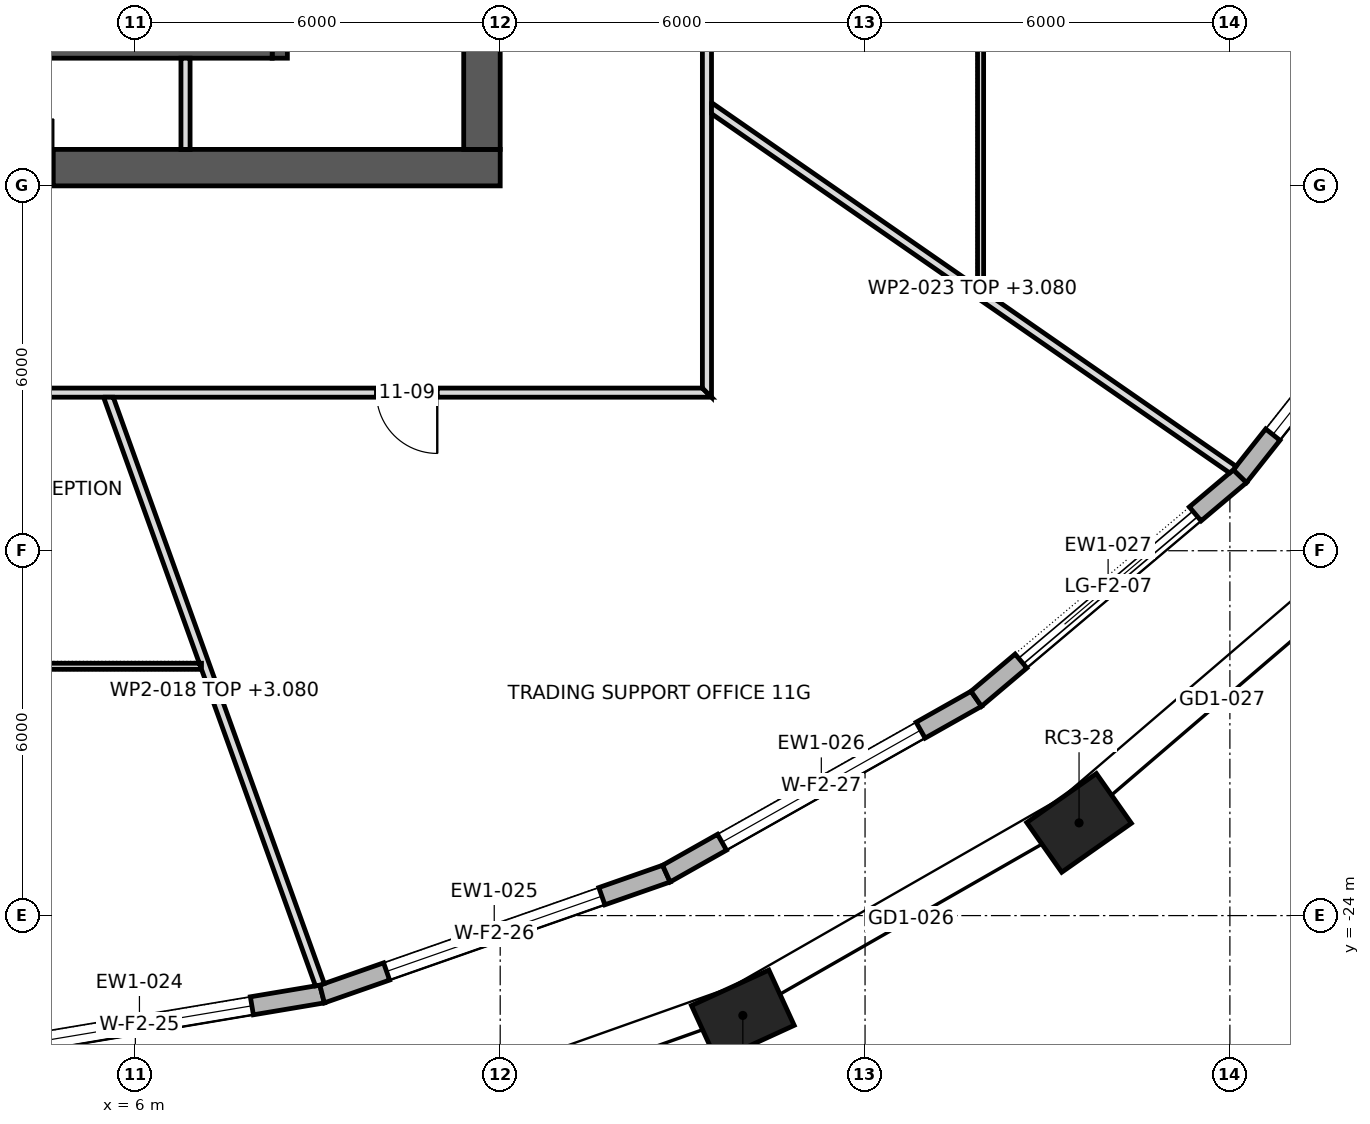
"""IFC4 building model, lengths in metres.
Left out: names, types, materials, properties, quantities, classifications, styles, units other than length and angle.
Written with IfcOpenShell. Run it as: python <this file> out.ifc"""

import sys

from ifc_helpers import new_model, si_unit, direction, frame, frame_2d, origin, origin_2d, place, context, subcontext, project, spatial, polyline, rectangle, outline, extrude, element, fill, save


model = new_model("IFC4")
c1 = context("Model", 3, precision=1e-05, world=origin(), true_north=direction((0.0, 1.0)))
c2 = subcontext(c1, "Body", "Model", "MODEL_VIEW")
j1 = project(units=[si_unit("LENGTHUNIT", "METRE"), si_unit("PLANEANGLEUNIT", "RADIAN")], contexts=[c1])
p1 = place(None, origin())
s1 = spatial("IfcSite", under=j1, at=p1, CompositionType="ELEMENT")
p2 = place(p1, origin())
s2 = spatial("IfcBuilding", under=s1, at=p2, CompositionType="ELEMENT")
p3 = place(p2, frame((0.0, 0.0, 163.3)))
s3 = spatial("IfcBuildingStorey", under=s2, at=p3, CompositionType="ELEMENT", Elevation=163.3)
for number, where, z_axis, x_axis in (
    (1, (15.99, -25.642, 0.0), (0.0, 0.0, 1.0), (0.909, 0.417, 0.0)),
    (2, (21.519, -22.475, 0.0), (0.0, 0.0, 1.0), (0.818, 0.575, 0.0)),
):
    element("IfcColumn", number, at=place(p3, frame(where, z_axis=z_axis, x_axis=x_axis)), inside=s3, PredefinedType="COLUMN", context=c2, shape_type="SweptSolid", body=[
        extrude(rectangle(XDim=1.4, YDim=1.0, at=origin_2d()), origin(), (0.0, 0.0, 1.0), 4.2),
    ])
p4 = place(p3, frame((-12.0, -11.7, 0.0), z_axis=(0.0, 0.0, 1.0), x_axis=(1.0, 0.0, 0.0)))
e3 = element("IfcWall", 3, at=p4, inside=s3, PredefinedType="SHEAR", context=c2, shape_type="SweptSolid", body=[
    extrude(rectangle(XDim=24.0, YDim=0.6, at=frame_2d((12.0, 0.0))), origin(), (0.0, 0.0, 1.0), 4.2),
])
p5 = place(p4, frame((9.975, 0.0, 0.0)))
e4 = element("IfcOpeningElement", 4, at=p5, cuts=e3, PredefinedType="OPENING", context=c2, shape_type="SweptSolid", body=[
    extrude(rectangle(XDim=0.9, YDim=2.1, at=frame_2d((0.45, 1.05))), frame((0.0, 0.312, 0.0), z_axis=(0.0, -1.0, 0.0), x_axis=(1.0, 0.0, 0.0)), (0.0, 0.0, 1.0), 0.624),
])
p6 = place(p4, frame((4.6, 0.0, 0.0)))
e5 = element("IfcOpeningElement", 5, at=p6, cuts=e3, PredefinedType="OPENING", context=c2, shape_type="SweptSolid", body=[
    extrude(rectangle(XDim=0.8, YDim=2.1, at=frame_2d((0.4, 1.05))), frame((0.0, 0.312, 0.0), z_axis=(0.0, -1.0, 0.0), x_axis=(1.0, 0.0, 0.0)), (0.0, 0.0, 1.0), 0.624),
])
p7 = place(p4, frame((7.0, 0.0, 0.0)))
e6 = element("IfcOpeningElement", 6, at=p7, cuts=e3, PredefinedType="OPENING", context=c2, shape_type="SweptSolid", body=[
    extrude(rectangle(XDim=0.8, YDim=2.1, at=frame_2d((0.4, 1.05))), frame((0.0, 0.312, 0.0), z_axis=(0.0, -1.0, 0.0), x_axis=(1.0, 0.0, 0.0)), (0.0, 0.0, 1.0), 0.624),
])
p8 = place(p4, frame((15.85, 0.0, 0.0)))
e7 = element("IfcOpeningElement", 7, at=p8, cuts=e3, PredefinedType="OPENING", context=c2, shape_type="SweptSolid", body=[
    extrude(rectangle(XDim=0.8, YDim=2.1, at=frame_2d((0.4, 1.05))), frame((0.0, 0.312, 0.0), z_axis=(0.0, -1.0, 0.0), x_axis=(1.0, 0.0, 0.0)), (0.0, 0.0, 1.0), 0.624),
])
p9 = place(p3, frame((11.7, -11.4, 0.0), z_axis=(0.0, 0.0, 1.0), x_axis=(0.0, 1.0, 0.0)))
e8 = element("IfcWall", 8, at=p9, inside=s3, PredefinedType="SHEAR", context=c2, shape_type="SweptSolid", body=[
    extrude(rectangle(XDim=22.8, YDim=0.6, at=frame_2d((11.4, 0.0))), origin(), (0.0, 0.0, 1.0), 4.2),
])
p10 = place(p9, frame((10.2, 0.0, 0.0)))
e9 = element("IfcOpeningElement", 9, at=p10, cuts=e8, PredefinedType="OPENING", context=c2, shape_type="SweptSolid", body=[
    extrude(rectangle(XDim=2.4, YDim=2.1, at=frame_2d((1.2, 1.05))), frame((0.0, 0.312, 0.0), z_axis=(0.0, -1.0, 0.0), x_axis=(1.0, 0.0, 0.0)), (0.0, 0.0, 1.0), 0.624),
])
p11 = place(p9, frame((19.5, 0.0, 0.0)))
e10 = element("IfcOpeningElement", 10, at=p11, cuts=e8, PredefinedType="OPENING", context=c2, shape_type="SweptSolid", body=[
    extrude(rectangle(XDim=1.2, YDim=2.1, at=frame_2d((0.6, 1.05))), frame((0.0, 0.312, 0.0), z_axis=(0.0, -1.0, 0.0), x_axis=(1.0, 0.0, 0.0)), (0.0, 0.0, 1.0), 0.624),
])
p12 = place(p9, frame((2.1, 0.0, 0.0)))
e11 = element("IfcOpeningElement", 11, at=p12, cuts=e8, PredefinedType="OPENING", context=c2, shape_type="SweptSolid", body=[
    extrude(rectangle(XDim=1.2, YDim=2.1, at=frame_2d((0.6, 1.05))), frame((0.0, 0.312, 0.0), z_axis=(0.0, -1.0, 0.0), x_axis=(1.0, 0.0, 0.0)), (0.0, 0.0, 1.0), 0.624),
])
p13 = place(p3, frame((3.063, -26.299, 0.0), z_axis=(0.0, 0.0, 1.0), x_axis=(0.98618955457, 0.165620537547, 0.0)))
e12 = element("IfcWall", 12, at=p13, inside=s3, PredefinedType="STANDARD", context=c2, shape_type="SweptSolid", body=[
    extrude(outline(polyline([(-0.012, -0.15), (6.105, -0.15), (6.08, 0.15), (0.012, 0.15), (-0.012, -0.15)])), origin(), (0.0, 0.0, 1.0), 3.85),
])
p14 = place(p13, frame((1.171, 0.0, 0.6)))
e13 = element("IfcOpeningElement", 13, at=p14, cuts=e12, PredefinedType="OPENING", context=c2, shape_type="SweptSolid", body=[
    extrude(rectangle(XDim=3.75, YDim=2.85, at=frame_2d((1.875, 1.425))), frame((0.0, 0.162, 0.0), z_axis=(0.0, -1.0, 0.0), x_axis=(1.0, 0.0, 0.0)), (0.0, 0.0, 1.0), 0.324),
])
p15 = place(p3, frame((9.071, -25.29, 0.0), z_axis=(0.0, 0.0, 1.0), x_axis=(0.943944636678, 0.330103806228, 0.0)))
e14 = element("IfcWall", 14, at=p15, inside=s3, PredefinedType="STANDARD", context=c2, shape_type="SweptSolid", body=[
    extrude(outline(polyline([(-0.013, -0.15), (6.011, -0.15), (5.984, 0.15), (0.013, 0.15), (-0.013, -0.15)])), origin(), (0.0, 0.0, 1.0), 3.85),
])
p16 = place(p15, frame((1.124, 0.0, 0.6)))
e15 = element("IfcOpeningElement", 15, at=p16, cuts=e14, PredefinedType="OPENING", context=c2, shape_type="SweptSolid", body=[
    extrude(rectangle(XDim=3.75, YDim=2.85, at=frame_2d((1.875, 1.425))), frame((0.0, 0.162, 0.0), z_axis=(0.0, -1.0, 0.0), x_axis=(1.0, 0.0, 0.0)), (0.0, 0.0, 1.0), 0.324),
])
p17 = place(p3, frame((14.732, -23.31, 0.0), z_axis=(0.0, 0.0, 1.0), x_axis=(0.870982130072, 0.491314694565, 0.0)))
e16 = element("IfcWall", 16, at=p17, inside=s3, PredefinedType="STANDARD", context=c2, shape_type="SweptSolid", body=[
    extrude(outline(polyline([(-0.013, -0.15), (5.866, -0.15), (5.837, 0.15), (0.013, 0.15), (-0.013, -0.15)])), origin(), (0.0, 0.0, 1.0), 3.85),
])
p18 = place(p17, frame((1.051, 0.0, 0.6)))
e17 = element("IfcOpeningElement", 17, at=p18, cuts=e16, PredefinedType="OPENING", context=c2, shape_type="SweptSolid", body=[
    extrude(rectangle(XDim=3.75, YDim=2.85, at=frame_2d((1.875, 1.425))), frame((0.0, 0.162, 0.0), z_axis=(0.0, -1.0, 0.0), x_axis=(1.0, 0.0, 0.0)), (0.0, 0.0, 1.0), 0.324),
])
p19 = place(p3, frame((19.829, -20.435, 0.0), z_axis=(0.0, 0.0, 1.0), x_axis=(0.764076096085, 0.645126126732, 0.0)))
e18 = element("IfcWall", 18, at=p19, inside=s3, PredefinedType="STANDARD", context=c2, shape_type="SweptSolid", body=[
    extrude(outline(polyline([(-0.014, -0.15), (5.69, -0.15), (5.66, 0.15), (0.014, 0.15), (-0.014, -0.15)])), origin(), (0.0, 0.0, 1.0), 3.85),
])
p20 = place(p19, frame((0.962, 0.0, 0.0)))
e19 = element("IfcOpeningElement", 19, at=p20, cuts=e18, PredefinedType="OPENING", context=c2, shape_type="SweptSolid", body=[
    extrude(rectangle(XDim=3.75, YDim=3.45, at=frame_2d((1.875, 1.725))), frame((0.0, 0.162, 0.0), z_axis=(0.0, -1.0, 0.0), x_axis=(1.0, 0.0, 0.0)), (0.0, 0.0, 1.0), 0.324),
])
p21 = place(p3, frame((24.165, -16.774, 0.0), z_axis=(0.0, 0.0, 1.0), x_axis=(0.620577705153, 0.784144955902, 0.0)))
e20 = element("IfcWall", 20, at=p21, inside=s3, PredefinedType="STANDARD", context=c2, shape_type="SweptSolid", body=[
    extrude(outline(polyline([(-0.015, -0.15), (5.509, -0.15), (5.477, 0.15), (0.015, 0.15), (-0.015, -0.15)])), origin(), (0.0, 0.0, 1.0), 3.85),
])
p22 = place(p21, frame((0.871, 0.0, 0.6)))
e21 = element("IfcOpeningElement", 21, at=p22, cuts=e20, PredefinedType="OPENING", context=c2, shape_type="SweptSolid", body=[
    extrude(rectangle(XDim=3.75, YDim=2.85, at=frame_2d((1.875, 1.425))), frame((0.0, 0.162, 0.0), z_axis=(0.0, -1.0, 0.0), x_axis=(1.0, 0.0, 0.0)), (0.0, 0.0, 1.0), 0.324),
])
p23 = place(p3, frame((8.375, -9.9, 0.0), z_axis=(0.0, 0.0, 1.0), x_axis=(0.0, 1.0, 0.0)))
e22 = element("IfcWall", 22, at=p23, inside=s3, PredefinedType="SHEAR", context=c2, shape_type="SweptSolid", body=[
    extrude(rectangle(XDim=3.4, YDim=0.25, at=frame_2d((1.7, 0.0))), origin(), (0.0, 0.0, 1.0), 3.85),
])
p24 = place(p23, frame((1.175, 0.0, 0.0)))
e23 = element("IfcOpeningElement", 23, at=p24, cuts=e22, PredefinedType="OPENING", context=c2, shape_type="SweptSolid", body=[
    extrude(rectangle(XDim=1.2, YDim=2.1, at=frame_2d((0.6, 1.05))), frame((0.0, 0.137, 0.0), z_axis=(0.0, -1.0, 0.0), x_axis=(1.0, 0.0, 0.0)), (0.0, 0.0, 1.0), 0.274),
])
p25 = place(p3, frame((0.25, -9.825, 0.0), z_axis=(0.0, 0.0, 1.0), x_axis=(1.0, 0.0, 0.0)))
e24 = element("IfcWall", 24, at=p25, inside=s3, PredefinedType="SHEAR", context=c2, shape_type="SweptSolid", body=[
    extrude(rectangle(XDim=8.0, YDim=0.15, at=frame_2d((4.0, 0.0))), origin(), (0.0, 0.0, 1.0), 3.85),
])
p26 = place(p3, frame((6.825, -11.4, 0.0), z_axis=(0.0, 0.0, 1.0), x_axis=(0.0, 1.0, 0.0)))
e25 = element("IfcWall", 25, at=p26, inside=s3, PredefinedType="PARTITIONING", context=c2, shape_type="SweptSolid", body=[
    extrude(rectangle(XDim=1.5, YDim=0.15, at=frame_2d((0.75, 0.0))), origin(), (0.0, 0.0, 1.0), 3.85),
])
p27 = place(p3, frame((-15.475, -15.4, 0.0), z_axis=(0.0, 0.0, 1.0), x_axis=(1.0, 0.0, 0.0)))
e26 = element("IfcWall", 26, at=p27, inside=s3, PredefinedType="PARTITIONING", context=c2, shape_type="SweptSolid", body=[
    extrude(outline(polyline([(0.0, -0.075), (1.935, -0.075), (3.869, -0.075), (5.803, -0.075), (7.738, -0.075), (9.672, -0.075), (11.606, -0.075), (13.541, -0.075), (15.475, -0.075), (17.409, -0.075), (19.344, -0.075), (21.278, -0.075), (23.212, -0.075), (25.147, -0.075), (27.081, -0.075), (29.016, -0.075), (30.95, -0.075), (30.8, 0.075), (28.885, 0.075), (26.969, 0.075), (25.053, 0.075), (23.138, 0.075), (21.222, 0.075), (19.306, 0.075), (17.391, 0.075), (15.475, 0.075), (13.56, 0.075), (11.644, 0.075), (9.728, 0.075), (7.812, 0.075), (5.897, 0.075), (3.981, 0.075), (2.066, 0.075), (0.15, 0.075), (0.0, -0.075)])), origin(), (0.0, 0.0, 1.0), 3.85),
])
p28 = place(p27, frame((11.785, 0.0, 0.0)))
e27 = element("IfcOpeningElement", 27, at=p28, cuts=e26, PredefinedType="OPENING", context=c2, shape_type="SweptSolid", body=[
    extrude(rectangle(XDim=1.0, YDim=2.1, at=frame_2d((0.5, 1.05))), frame((0.0, 0.087, 0.0), z_axis=(0.0, -1.0, 0.0), x_axis=(1.0, 0.0, 0.0)), (0.0, 0.0, 1.0), 0.174),
])
p29 = place(p27, frame((17.315, 0.0, 0.0)))
e28 = element("IfcOpeningElement", 28, at=p29, cuts=e26, PredefinedType="OPENING", context=c2, shape_type="SweptSolid", body=[
    extrude(rectangle(XDim=1.0, YDim=2.1, at=frame_2d((0.5, 1.05))), frame((0.0, 0.087, 0.0), z_axis=(0.0, -1.0, 0.0), x_axis=(1.0, 0.0, 0.0)), (0.0, 0.0, 1.0), 0.174),
])
p30 = place(p27, frame((25.44, 0.0, 0.0)))
e29 = element("IfcOpeningElement", 29, at=p30, cuts=e26, PredefinedType="OPENING", context=c2, shape_type="SweptSolid", body=[
    extrude(rectangle(XDim=1.0, YDim=2.1, at=frame_2d((0.5, 1.05))), frame((0.0, 0.087, 0.0), z_axis=(0.0, -1.0, 0.0), x_axis=(1.0, 0.0, 0.0)), (0.0, 0.0, 1.0), 0.174),
])
p31 = place(p3, frame((-7.087, -19.9, 0.0), z_axis=(0.0, 0.0, 1.0), x_axis=(1.0, 0.0, 0.0)))
e30 = element("IfcWall", 30, at=p31, inside=s3, PredefinedType="PARTITIONING", context=c2, shape_type="SweptSolid", body=[
    extrude(outline(polyline([(14.175, -0.05), (14.175, -0.049), (14.139, 0.05), (12.176, 0.05), (10.213, 0.05), (8.25, 0.05), (6.287, 0.05), (6.287, 0.05), (6.188, 0.05), (6.188, 0.05), (4.649, 0.05), (3.112, 0.05), (1.573, 0.05), (0.036, 0.05), (0.0, -0.049), (0.0, -0.05), (1.772, -0.05), (3.544, -0.05), (5.315, -0.05), (7.087, -0.05), (8.859, -0.05), (10.631, -0.05), (12.403, -0.05), (14.175, -0.05)])), origin(), (0.0, 0.0, 1.0), 3.85),
])
p32 = place(p31, frame((9.788, 0.0, 0.0)))
e31 = element("IfcOpeningElement", 31, at=p32, cuts=e30, PredefinedType="OPENING", context=c2, shape_type="SweptSolid", body=[
    extrude(rectangle(XDim=0.9, YDim=2.1, at=frame_2d((0.45, 1.05))), frame((0.0, 0.062, 0.0), z_axis=(0.0, -1.0, 0.0), x_axis=(1.0, 0.0, 0.0)), (0.0, 0.0, 1.0), 0.124),
])
p33 = place(p3, frame((5.548, -15.45, 0.0), z_axis=(0.0, 0.0, 1.0), x_axis=(0.338668278724, -0.940905838533, 0.0)))
e32 = element("IfcWall", 32, at=p33, inside=s3, PredefinedType="PARTITIONING", context=c2, shape_type="SweptSolid", body=[
    extrude(outline(polyline([(0.0, -0.075), (1.55, -0.075), (3.1, -0.075), (4.649, -0.075), (4.661, -0.042), (4.754, -0.075), (6.599, -0.075), (8.444, -0.075), (10.289, -0.075), (10.302, -0.003), (10.302, 0.064), (10.302, 0.075), (8.594, 0.075), (6.886, 0.075), (5.178, 0.075), (3.47, 0.075), (1.762, 0.075), (0.054, 0.075), (0.0, -0.074), (0.0, -0.075)])), origin(), (0.0, 0.0, 1.0), 3.08),
])
p34 = place(p3, frame((15.4, -15.475, 0.0), z_axis=(0.0, 0.0, 1.0), x_axis=(0.0, 1.0, 0.0)))
e33 = element("IfcWall", 33, at=p34, inside=s3, PredefinedType="PARTITIONING", context=c2, shape_type="SweptSolid", body=[
    extrude(outline(polyline([(0.0, -0.075), (1.935, -0.075), (3.869, -0.075), (5.803, -0.075), (7.738, -0.075), (9.672, -0.075), (11.606, -0.075), (13.541, -0.075), (15.475, -0.075), (17.409, -0.075), (19.344, -0.075), (21.278, -0.075), (23.212, -0.075), (25.147, -0.075), (27.081, -0.075), (29.016, -0.075), (30.95, -0.075), (30.8, 0.075), (28.885, 0.075), (26.969, 0.075), (25.053, 0.075), (23.138, 0.075), (21.222, 0.075), (19.306, 0.075), (17.391, 0.075), (15.475, 0.075), (13.56, 0.075), (11.644, 0.075), (9.728, 0.075), (7.812, 0.075), (5.897, 0.075), (3.981, 0.075), (2.066, 0.075), (0.15, 0.075), (0.0, -0.075)])), origin(), (0.0, 0.0, 1.0), 3.85),
])
p35 = place(p34, frame((9.0, 0.0, 0.0)))
e34 = element("IfcOpeningElement", 34, at=p35, cuts=e33, PredefinedType="OPENING", context=c2, shape_type="SweptSolid", body=[
    extrude(rectangle(XDim=1.0, YDim=2.1, at=frame_2d((0.5, 1.05))), frame((0.0, 0.087, 0.0), z_axis=(0.0, -1.0, 0.0), x_axis=(1.0, 0.0, 0.0)), (0.0, 0.0, 1.0), 0.174),
])
p36 = place(p34, frame((21.635, 0.0, 0.0)))
e35 = element("IfcOpeningElement", 35, at=p36, cuts=e33, PredefinedType="OPENING", context=c2, shape_type="SweptSolid", body=[
    extrude(rectangle(XDim=1.8, YDim=2.1, at=frame_2d((0.9, 1.05))), frame((0.0, 0.087, 0.0), z_axis=(0.0, -1.0, 0.0), x_axis=(1.0, 0.0, 0.0)), (0.0, 0.0, 1.0), 0.174),
])
p37 = place(p3, frame((15.433, -10.692, 0.0), z_axis=(0.0, 0.0, 1.0), x_axis=(0.821818585553, -0.569749254006, 0.0)))
e36 = element("IfcWall", 36, at=p37, inside=s3, PredefinedType="PARTITIONING", context=c2, shape_type="SweptSolid", body=[
    extrude(outline(polyline([(0.104, -0.075), (1.832, -0.075), (3.56, -0.075), (5.288, -0.075), (7.016, -0.075), (8.744, -0.075), (10.472, -0.075), (10.493, 0.002), (10.497, 0.072), (10.497, 0.075), (8.773, 0.075), (7.049, 0.075), (5.325, 0.075), (5.324, 0.074), (5.323, 0.075), (3.549, 0.075), (1.774, 0.075), (0.0, 0.075), (0.0, 0.074), (0.104, -0.075)])), origin(), (0.0, 0.0, 1.0), 3.08),
])
p38 = place(p3, frame((19.9, -1.726, 0.0), z_axis=(0.0, 0.0, 1.0), x_axis=(0.0, -1.0, 0.0)))
e37 = element("IfcWall", 37, at=p38, inside=s3, PredefinedType="PARTITIONING", context=c2, shape_type="SweptSolid", body=[
    extrude(outline(polyline([(0.0, -0.05), (1.99, -0.05), (3.979, -0.05), (5.969, -0.05), (7.959, -0.05), (9.948, -0.05), (11.938, -0.05), (12.007, 0.049), (12.007, 0.05), (10.007, 0.05), (8.007, 0.05), (6.007, 0.05), (4.008, 0.05), (2.008, 0.05), (0.008, 0.05), (0.0, -0.047), (0.0, -0.05)])), origin(), (0.0, 0.0, 1.0), 3.85),
])
p39 = place(p38, frame((5.544, 0.0, 0.0)))
e38 = element("IfcOpeningElement", 38, at=p39, cuts=e37, PredefinedType="OPENING", context=c2, shape_type="SweptSolid", body=[
    extrude(rectangle(XDim=0.9, YDim=2.1, at=frame_2d((0.45, 1.05))), frame((0.0, 0.062, 0.0), z_axis=(0.0, -1.0, 0.0), x_axis=(1.0, 0.0, 0.0)), (0.0, 0.0, 1.0), 0.124),
])
p40 = place(p14, origin())
e39 = element("IfcWindow", 39, at=p40, inside=s3, PartitioningType="TRIPLE_PANEL_VERTICAL", PredefinedType="WINDOW", context=c2, shape_type="SweptSolid", body=[
    extrude(rectangle(XDim=3.75, YDim=2.85, at=frame_2d((1.875, 1.425))), frame((0.0, 0.03, 0.0), z_axis=(0.0, -1.0, 0.0), x_axis=(1.0, 0.0, 0.0)), (0.0, 0.0, 1.0), 0.06),
])
fill(e13, e39)
p41 = place(p16, origin())
e40 = element("IfcWindow", 40, at=p41, inside=s3, PartitioningType="TRIPLE_PANEL_VERTICAL", PredefinedType="WINDOW", context=c2, shape_type="SweptSolid", body=[
    extrude(rectangle(XDim=3.75, YDim=2.85, at=frame_2d((1.875, 1.425))), frame((0.0, 0.03, 0.0), z_axis=(0.0, -1.0, 0.0), x_axis=(1.0, 0.0, 0.0)), (0.0, 0.0, 1.0), 0.06),
])
fill(e15, e40)
p42 = place(p18, origin())
e41 = element("IfcWindow", 41, at=p42, inside=s3, PartitioningType="TRIPLE_PANEL_VERTICAL", PredefinedType="WINDOW", context=c2, shape_type="SweptSolid", body=[
    extrude(rectangle(XDim=3.75, YDim=2.85, at=frame_2d((1.875, 1.425))), frame((0.0, 0.03, 0.0), z_axis=(0.0, -1.0, 0.0), x_axis=(1.0, 0.0, 0.0)), (0.0, 0.0, 1.0), 0.06),
])
fill(e17, e41)
p43 = place(p20, origin())
e42 = element("IfcDoor", 42, at=p43, inside=s3, OperationType="DOUBLE_DOOR_SLIDING", PredefinedType="DOOR", context=c2, shape_type="SweptSolid", body=[
    extrude(rectangle(XDim=3.75, YDim=3.45, at=frame_2d((1.875, 1.725))), frame((0.0, 0.025, 0.0), z_axis=(0.0, -1.0, 0.0), x_axis=(1.0, 0.0, 0.0)), (0.0, 0.0, 1.0), 0.05),
])
fill(e19, e42)
p44 = place(p22, origin())
e43 = element("IfcWindow", 43, at=p44, inside=s3, PartitioningType="TRIPLE_PANEL_VERTICAL", PredefinedType="WINDOW", context=c2, shape_type="SweptSolid", body=[
    extrude(rectangle(XDim=3.75, YDim=2.85, at=frame_2d((1.875, 1.425))), frame((0.0, 0.03, 0.0), z_axis=(0.0, -1.0, 0.0), x_axis=(1.0, 0.0, 0.0)), (0.0, 0.0, 1.0), 0.06),
])
fill(e21, e43)
p45 = place(p8, origin())
e44 = element("IfcDoor", 44, at=p45, inside=s3, OperationType="SINGLE_SWING_LEFT", PredefinedType="DOOR", context=c2, shape_type="SweptSolid", body=[
    extrude(rectangle(XDim=0.8, YDim=2.1, at=frame_2d((0.4, 1.05))), frame((0.0, 0.025, 0.0), z_axis=(0.0, -1.0, 0.0), x_axis=(1.0, 0.0, 0.0)), (0.0, 0.0, 1.0), 0.05),
])
fill(e7, e44)
p46 = place(p30, frame((1.0, 0.0, 0.0), z_axis=(0.0, 0.0, 1.0), x_axis=(-1.0, 0.0, 0.0)))
e45 = element("IfcDoor", 45, at=p46, inside=s3, OperationType="SINGLE_SWING_RIGHT", PredefinedType="DOOR", context=c2, shape_type="SweptSolid", body=[
    extrude(rectangle(XDim=1.0, YDim=2.1, at=frame_2d((0.5, 1.05))), frame((0.0, 0.025, 0.0), z_axis=(0.0, -1.0, 0.0), x_axis=(1.0, 0.0, 0.0)), (0.0, 0.0, 1.0), 0.05),
])
fill(e29, e45)
save(model, sys.argv[1])
